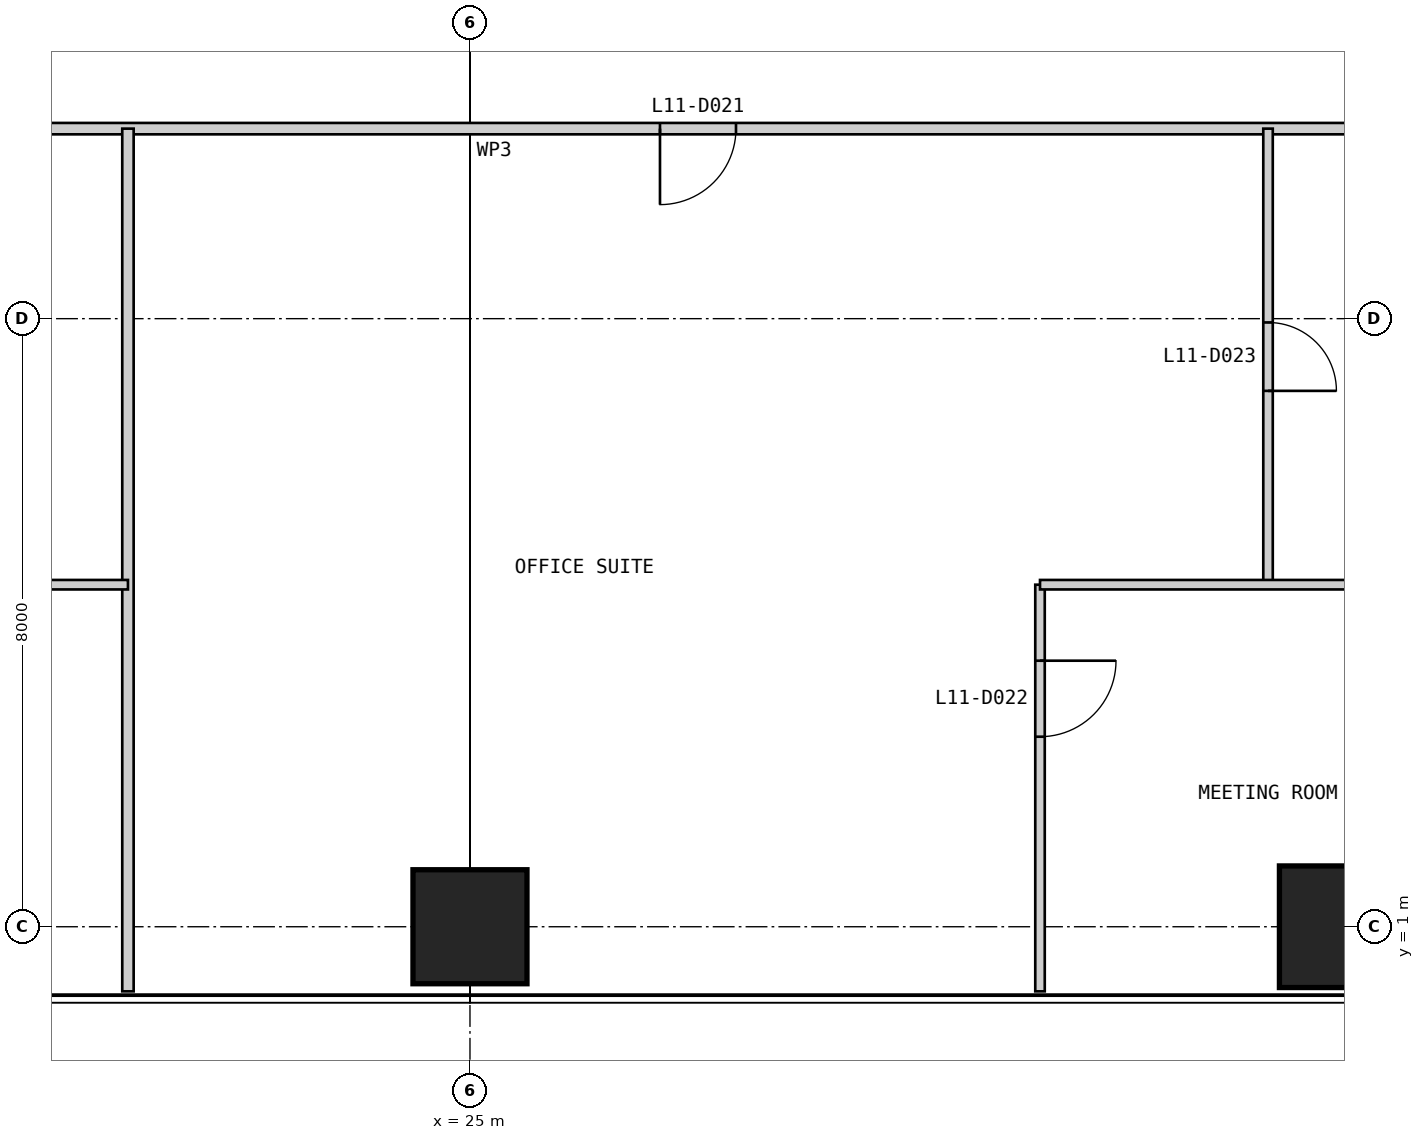
"""IFC4 building model, lengths in metres.
Left out: names, types, materials, properties, quantities, classifications, styles, units other than length and angle.
Written with IfcOpenShell. Run it as: python <this file> out.ifc"""

import sys

from ifc_helpers import new_model, si_unit, direction, frame, frame_2d, origin, origin_2d, place, context, subcontext, project, spatial, rectangle, extrude, element, fill, save


model = new_model("IFC4")
c1 = context("Model", 3, precision=1e-05, world=origin(), true_north=direction((0.0, 1.0)))
c2 = subcontext(c1, "Body", "Model", "MODEL_VIEW")
j1 = project(units=[si_unit("LENGTHUNIT", "METRE"), si_unit("PLANEANGLEUNIT", "RADIAN")], contexts=[c1])
p1 = place(None, origin())
s1 = spatial("IfcSite", under=j1, at=p1, CompositionType="ELEMENT")
p2 = place(p1, origin())
s2 = spatial("IfcBuilding", under=s1, at=p2, CompositionType="ELEMENT")
p3 = place(p2, frame((0.0, 0.0, 51.0)))
s3 = spatial("IfcBuildingStorey", under=s2, at=p3, CompositionType="ELEMENT", Elevation=51.0)
p4 = place(p3, frame((25.0, 1.0, 0.0), z_axis=(0.0, 0.0, 1.0), x_axis=(1.0, 0.0, 0.0)))
e1 = element("IfcColumn", 1, at=p4, inside=s3, PredefinedType="COLUMN", context=c2, shape_type="SweptSolid", body=[
    extrude(rectangle(XDim=1.5, YDim=1.5, at=origin_2d()), origin(), (0.0, 0.0, 1.0), 4.0),
])
p5 = place(p3, frame((37.0, 1.0, 0.0), z_axis=(0.0, 0.0, 1.0), x_axis=(1.0, 0.0, 0.0)))
e2 = element("IfcColumn", 2, at=p5, inside=s3, PredefinedType="COLUMN", context=c2, shape_type="SweptSolid", body=[
    extrude(rectangle(XDim=2.7, YDim=1.6, at=origin_2d()), origin(), (0.0, 0.0, 1.0), 4.0),
])
p6 = place(p3, frame((11.5, 11.5, 0.0), z_axis=(0.0, 0.0, 1.0), x_axis=(1.0, 0.0, 0.0)))
e3 = element("IfcWall", 3, at=p6, inside=s3, PredefinedType="PARTITIONING", context=c2, shape_type="SweptSolid", body=[
    extrude(rectangle(XDim=27.0, YDim=0.15, at=frame_2d((13.5, 0.0))), origin(), (0.0, 0.0, 1.0), 3.85),
])
p7 = place(p6, frame((2.5, 0.0, 0.0)))
e4 = element("IfcOpeningElement", 4, at=p7, cuts=e3, PredefinedType="OPENING", context=c2, shape_type="SweptSolid", body=[
    extrude(rectangle(XDim=1.0, YDim=2.2, at=frame_2d((0.5, 1.1))), frame((0.0, 0.085, 0.0), z_axis=(0.0, -1.0, 0.0), x_axis=(1.0, 0.0, 0.0)), (0.0, 0.0, 1.0), 0.17),
])
p8 = place(p6, frame((16.0, 0.0, 0.0)))
e5 = element("IfcOpeningElement", 5, at=p8, cuts=e3, PredefinedType="OPENING", context=c2, shape_type="SweptSolid", body=[
    extrude(rectangle(XDim=1.0, YDim=2.2, at=frame_2d((0.5, 1.1))), frame((0.0, 0.085, 0.0), z_axis=(0.0, -1.0, 0.0), x_axis=(1.0, 0.0, 0.0)), (0.0, 0.0, 1.0), 0.17),
])
p9 = place(p3, frame((20.5, 0.15, 0.0), z_axis=(0.0, 0.0, 1.0), x_axis=(0.0, 1.0, 0.0)))
e6 = element("IfcWall", 6, at=p9, inside=s3, PredefinedType="PARTITIONING", context=c2, shape_type="SweptSolid", body=[
    extrude(rectangle(XDim=11.35, YDim=0.15, at=frame_2d((5.675, 0.0))), origin(), (0.0, 0.0, 1.0), 3.85),
])
p10 = place(p3, frame((32.5, 0.15, 0.0), z_axis=(0.0, 0.0, 1.0), x_axis=(0.0, 1.0, 0.0)))
e7 = element("IfcWall", 7, at=p10, inside=s3, PredefinedType="PARTITIONING", context=c2, shape_type="SweptSolid", body=[
    extrude(rectangle(XDim=5.35, YDim=0.125, at=frame_2d((2.675, 0.0))), origin(), (0.0, 0.0, 1.0), 3.85),
])
p11 = place(p10, frame((3.35, 0.0, 0.0)))
e8 = element("IfcOpeningElement", 8, at=p11, cuts=e7, PredefinedType="OPENING", context=c2, shape_type="SweptSolid", body=[
    extrude(rectangle(XDim=1.0, YDim=2.2, at=frame_2d((0.5, 1.1))), frame((0.0, 0.073, 0.0), z_axis=(0.0, -1.0, 0.0), x_axis=(1.0, 0.0, 0.0)), (0.0, 0.0, 1.0), 0.145),
])
p12 = place(p3, frame((35.5, 5.5, 0.0), z_axis=(0.0, 0.0, 1.0), x_axis=(0.0, 1.0, 0.0)))
e9 = element("IfcWall", 9, at=p12, inside=s3, PredefinedType="PARTITIONING", context=c2, shape_type="SweptSolid", body=[
    extrude(rectangle(XDim=6.0, YDim=0.125, at=frame_2d((3.0, 0.0))), origin(), (0.0, 0.0, 1.0), 3.85),
])
p13 = place(p12, frame((2.55, 0.0, 0.0)))
e10 = element("IfcOpeningElement", 10, at=p13, cuts=e9, PredefinedType="OPENING", context=c2, shape_type="SweptSolid", body=[
    extrude(rectangle(XDim=0.9, YDim=2.2, at=frame_2d((0.45, 1.1))), frame((0.0, 0.073, 0.0), z_axis=(0.0, -1.0, 0.0), x_axis=(1.0, 0.0, 0.0)), (0.0, 0.0, 1.0), 0.145),
])
p14 = place(p3, frame((17.5, 5.5, 0.0), z_axis=(0.0, 0.0, 1.0), x_axis=(1.0, 0.0, 0.0)))
e11 = element("IfcWall", 11, at=p14, inside=s3, PredefinedType="PARTITIONING", context=c2, shape_type="SweptSolid", body=[
    extrude(rectangle(XDim=3.0, YDim=0.125, at=frame_2d((1.5, 0.0))), origin(), (0.0, 0.0, 1.0), 3.85),
])
p15 = place(p3, frame((32.5, 5.5, 0.0), z_axis=(0.0, 0.0, 1.0), x_axis=(1.0, 0.0, 0.0)))
e12 = element("IfcWall", 12, at=p15, inside=s3, PredefinedType="PARTITIONING", context=c2, shape_type="SweptSolid", body=[
    extrude(rectangle(XDim=6.0, YDim=0.125, at=frame_2d((3.0, 0.0))), origin(), (0.0, 0.0, 1.0), 3.85),
])
p16 = place(p8, frame((1.0, 0.0, 0.0), z_axis=(0.0, 0.0, 1.0), x_axis=(-1.0, 0.0, 0.0)))
e13 = element("IfcDoor", 13, at=p16, inside=s3, OperationType="SINGLE_SWING_RIGHT", PredefinedType="DOOR", context=c2, shape_type="SweptSolid", body=[
    extrude(rectangle(XDim=1.0, YDim=2.2, at=frame_2d((0.5, 1.1))), frame((0.0, 0.025, 0.0), z_axis=(0.0, -1.0, 0.0), x_axis=(1.0, 0.0, 0.0)), (0.0, 0.0, 1.0), 0.05),
])
fill(e5, e13)
p17 = place(p11, frame((1.0, 0.0, 0.0), z_axis=(0.0, 0.0, 1.0), x_axis=(-1.0, 0.0, 0.0)))
e14 = element("IfcDoor", 14, at=p17, inside=s3, OperationType="SINGLE_SWING_LEFT", PredefinedType="DOOR", context=c2, shape_type="SweptSolid", body=[
    extrude(rectangle(XDim=1.0, YDim=2.2, at=frame_2d((0.5, 1.1))), frame((0.0, 0.025, 0.0), z_axis=(0.0, -1.0, 0.0), x_axis=(1.0, 0.0, 0.0)), (0.0, 0.0, 1.0), 0.05),
])
fill(e8, e14)
p18 = place(p13, frame((0.9, 0.0, 0.0), z_axis=(0.0, 0.0, 1.0), x_axis=(-1.0, 0.0, 0.0)))
e15 = element("IfcDoor", 15, at=p18, inside=s3, OperationType="SINGLE_SWING_RIGHT", PredefinedType="DOOR", context=c2, shape_type="SweptSolid", body=[
    extrude(rectangle(XDim=0.9, YDim=2.2, at=frame_2d((0.45, 1.1))), frame((0.0, 0.025, 0.0), z_axis=(0.0, -1.0, 0.0), x_axis=(1.0, 0.0, 0.0)), (0.0, 0.0, 1.0), 0.05),
])
fill(e10, e15)
save(model, sys.argv[1])
